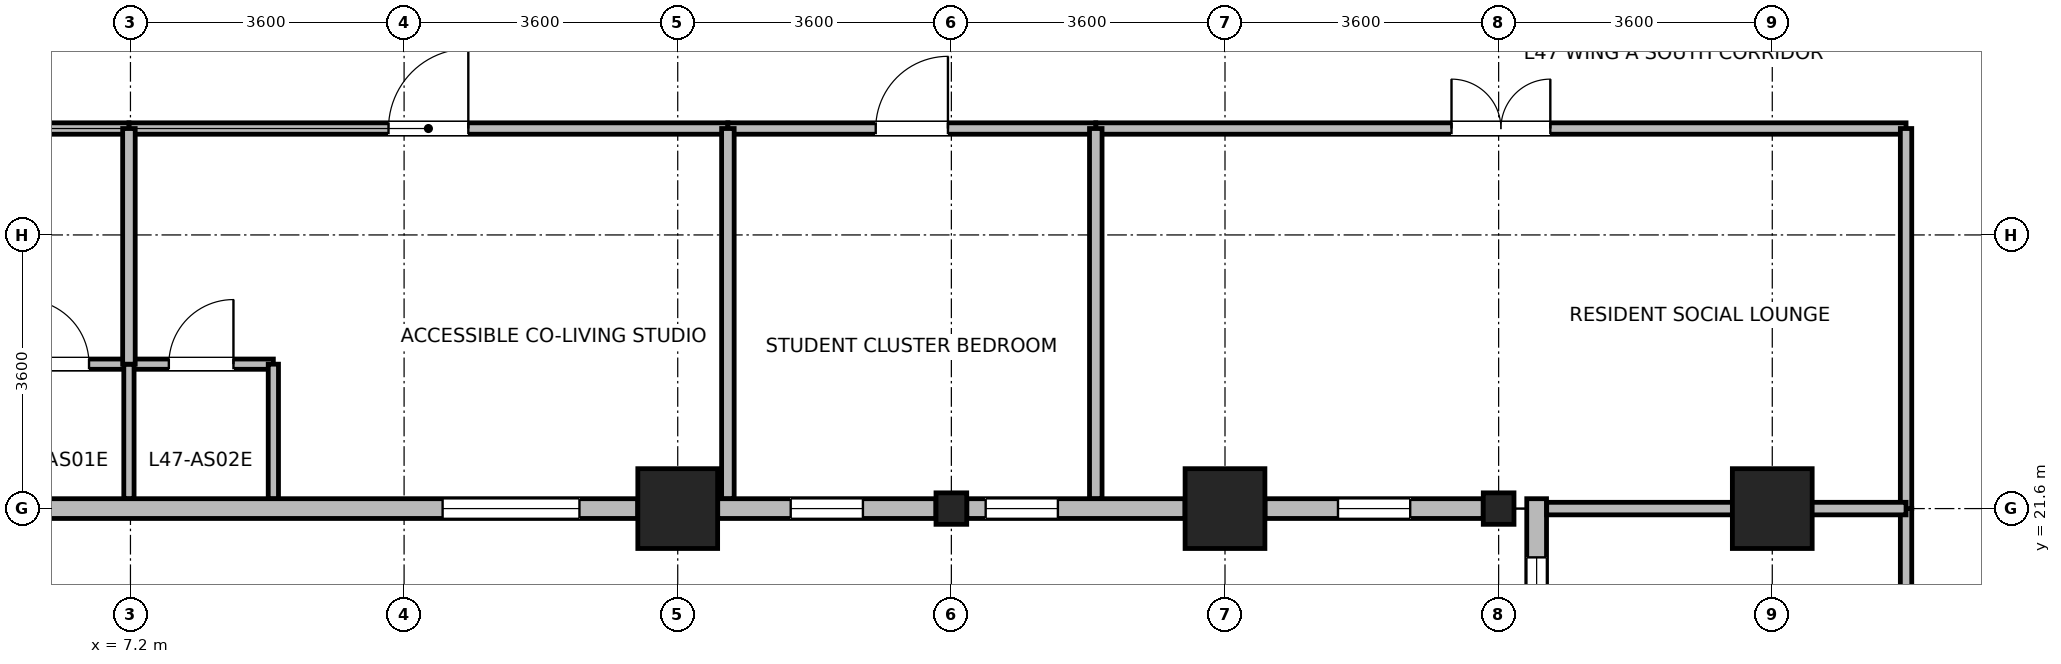
"""IFC4 building model, lengths in metres.
Left out: names, types, materials, properties, quantities, classifications, styles, units other than length and angle.
Written with IfcOpenShell. Run it as: python <this file> out.ifc"""

import sys

from ifc_helpers import new_model, si_unit, direction, frame, frame_2d, origin, origin_2d, place, context, subcontext, project, spatial, rectangle, i_section, extrude, source, transform, mapped, element, fill, save


model = new_model("IFC4")
c1 = context("Model", 3, precision=1e-05, world=origin(), true_north=direction((0.0, 1.0)))
c2 = subcontext(c1, "Body", "Model", "MODEL_VIEW")
j1 = project(units=[si_unit("LENGTHUNIT", "METRE"), si_unit("PLANEANGLEUNIT", "RADIAN")], contexts=[c1])
p1 = place(None, origin())
s1 = spatial("IfcSite", under=j1, at=p1, CompositionType="ELEMENT")
p2 = place(p1, origin())
s2 = spatial("IfcBuilding", under=s1, at=p2, CompositionType="ELEMENT")
p3 = place(p2, frame((0.0, 0.0, 184.6)))
s3 = spatial("IfcBuildingStorey", under=s2, at=p3, CompositionType="ELEMENT", Elevation=184.6)
m1 = source(origin(), c2, "Body", "SweptSolid", [
    extrude(rectangle(XDim=1.05, YDim=1.05, at=origin_2d()), origin(), (0.0, 0.0, 1.0), 3.7),
])
for number, where, z_axis, x_axis in (
    (1, (14.4, 21.6, 0.0), (0.0, 0.0, 1.0), (1.0, 0.0, 0.0)),
    (2, (21.6, 21.6, 0.0), (0.0, 0.0, 1.0), (1.0, 0.0, 0.0)),
    (3, (28.8, 21.6, 0.0), (0.0, 0.0, 1.0), (1.0, 0.0, 0.0)),
):
    element("IfcColumn", number, at=place(p3, frame(where, z_axis=z_axis, x_axis=x_axis)), inside=s3, PredefinedType="COLUMN", context=c2, shape_type="MappedRepresentation", body=[
        mapped(m1, transform((0.0, 0.0, 0.0), x_axis=(1.0, 0.0, 0.0), y_axis=(0.0, 1.0, 0.0), z_axis=(0.0, 0.0, 1.0), scale=1.0)),
    ])
m2 = source(origin(), c2, "Body", "SweptSolid", [
    extrude(i_section(OverallWidth=0.404, OverallDepth=0.414, WebThickness=0.021, FlangeThickness=0.028, FilletRadius=0.015, at=origin_2d()), origin(), (0.0, 0.0, 1.0), 3.7),
])
for number, where, z_axis, x_axis in (
    (4, (18.0, 21.6, 0.0), (0.0, 0.0, 1.0), (1.0, 0.0, 0.0)),
    (5, (25.2, 21.6, 0.0), (0.0, 0.0, 1.0), (1.0, 0.0, 0.0)),
):
    element("IfcColumn", number, at=place(p3, frame(where, z_axis=z_axis, x_axis=x_axis)), inside=s3, PredefinedType="COLUMN", context=c2, shape_type="MappedRepresentation", body=[
        mapped(m2, transform((0.0, 0.0, 0.0), x_axis=(1.0, 0.0, 0.0), y_axis=(0.0, 1.0, 0.0), z_axis=(0.0, 0.0, 1.0), scale=1.0)),
    ])
p4 = place(p3, frame((13.874, 21.6, 0.0), z_axis=(0.0, 0.0, 1.0), x_axis=(-1.0, 0.0, 0.0)))
e6 = element("IfcWall", 6, at=p4, inside=s3, PredefinedType="STANDARD", context=c2, shape_type="SweptSolid", body=[
    extrude(rectangle(XDim=13.337, YDim=0.26, at=frame_2d((6.668, 0.0))), origin(), (0.0, 0.0, 1.0), 3.44),
])
p5 = place(p4, frame((0.767, 0.0, 0.85)))
e7 = element("IfcOpeningElement", 7, at=p5, cuts=e6, PredefinedType="OPENING", context=c2, shape_type="SweptSolid", body=[
    extrude(rectangle(XDim=1.8, YDim=1.85, at=frame_2d((0.9, 0.925))), frame((0.0, 0.14, 0.0), z_axis=(0.0, -1.0, 0.0), x_axis=(1.0, 0.0, 0.0)), (0.0, 0.0, 1.0), 0.28),
])
p6 = place(p4, frame((10.77, 0.0, 0.85)))
e8 = element("IfcOpeningElement", 8, at=p6, cuts=e6, PredefinedType="OPENING", context=c2, shape_type="SweptSolid", body=[
    extrude(rectangle(XDim=1.8, YDim=1.85, at=frame_2d((0.9, 0.925))), frame((0.0, 0.14, 0.0), z_axis=(0.0, -1.0, 0.0), x_axis=(1.0, 0.0, 0.0)), (0.0, 0.0, 1.0), 0.28),
])
p7 = place(p3, frame((17.797, 21.6, 0.0), z_axis=(0.0, 0.0, 1.0), x_axis=(-1.0, 0.0, 0.0)))
e9 = element("IfcWall", 9, at=p7, inside=s3, PredefinedType="STANDARD", context=c2, shape_type="SweptSolid", body=[
    extrude(rectangle(XDim=2.871, YDim=0.26, at=frame_2d((1.436, 0.0))), origin(), (0.0, 0.0, 1.0), 2.99),
])
p8 = place(p7, frame((0.96, 0.0, 0.85)))
e10 = element("IfcOpeningElement", 10, at=p8, cuts=e9, PredefinedType="OPENING", context=c2, shape_type="SweptSolid", body=[
    extrude(rectangle(XDim=0.95, YDim=1.75, at=frame_2d((0.475, 0.875))), frame((0.0, 0.14, 0.0), z_axis=(0.0, -1.0, 0.0), x_axis=(1.0, 0.0, 0.0)), (0.0, 0.0, 1.0), 0.28),
])
p9 = place(p3, frame((21.074, 21.6, 0.0), z_axis=(0.0, 0.0, 1.0), x_axis=(-1.0, 0.0, 0.0)))
e11 = element("IfcWall", 11, at=p9, inside=s3, PredefinedType="STANDARD", context=c2, shape_type="SweptSolid", body=[
    extrude(rectangle(XDim=2.871, YDim=0.26, at=frame_2d((1.436, 0.0))), origin(), (0.0, 0.0, 1.0), 2.99),
])
p10 = place(p9, frame((1.673, 0.0, 0.85)))
e12 = element("IfcOpeningElement", 12, at=p10, cuts=e11, PredefinedType="OPENING", context=c2, shape_type="SweptSolid", body=[
    extrude(rectangle(XDim=0.95, YDim=1.75, at=frame_2d((0.475, 0.875))), frame((0.0, 0.14, 0.0), z_axis=(0.0, -1.0, 0.0), x_axis=(1.0, 0.0, 0.0)), (0.0, 0.0, 1.0), 0.28),
])
p11 = place(p3, frame((24.997, 21.6, 0.0), z_axis=(0.0, 0.0, 1.0), x_axis=(-1.0, 0.0, 0.0)))
e13 = element("IfcWall", 13, at=p11, inside=s3, PredefinedType="STANDARD", context=c2, shape_type="SweptSolid", body=[
    extrude(rectangle(XDim=2.871, YDim=0.26, at=frame_2d((1.436, 0.0))), origin(), (0.0, 0.0, 1.0), 2.99),
])
p12 = place(p11, frame((0.96, 0.0, 0.85)))
e14 = element("IfcOpeningElement", 14, at=p12, cuts=e13, PredefinedType="OPENING", context=c2, shape_type="SweptSolid", body=[
    extrude(rectangle(XDim=0.95, YDim=1.75, at=frame_2d((0.475, 0.875))), frame((0.0, 0.14, 0.0), z_axis=(0.0, -1.0, 0.0), x_axis=(1.0, 0.0, 0.0)), (0.0, 0.0, 1.0), 0.28),
])
p13 = place(p3, frame((25.7, 1.67, 0.0), z_axis=(0.0, 0.0, 1.0), x_axis=(0.0, 1.0, 0.0)))
e15 = element("IfcWall", 15, at=p13, inside=s3, PredefinedType="STANDARD", context=c2, shape_type="SweptSolid", body=[
    extrude(rectangle(XDim=20.06, YDim=0.26, at=frame_2d((10.03, 0.0))), origin(), (0.0, 0.0, 1.0), 3.44),
])
p14 = place(p13, frame((0.772, 0.0, 0.85)))
e16 = element("IfcOpeningElement", 16, at=p14, cuts=e15, PredefinedType="OPENING", context=c2, shape_type="SweptSolid", body=[
    extrude(rectangle(XDim=1.8, YDim=1.85, at=frame_2d((0.9, 0.925))), frame((0.0, 0.14, 0.0), z_axis=(0.0, -1.0, 0.0), x_axis=(1.0, 0.0, 0.0)), (0.0, 0.0, 1.0), 0.28),
])
p15 = place(p13, frame((7.458, 0.0, 0.85)))
e17 = element("IfcOpeningElement", 17, at=p15, cuts=e15, PredefinedType="OPENING", context=c2, shape_type="SweptSolid", body=[
    extrude(rectangle(XDim=1.8, YDim=1.85, at=frame_2d((0.9, 0.925))), frame((0.0, 0.14, 0.0), z_axis=(0.0, -1.0, 0.0), x_axis=(1.0, 0.0, 0.0)), (0.0, 0.0, 1.0), 0.28),
])
p16 = place(p13, frame((14.145, 0.0, 0.85)))
e18 = element("IfcOpeningElement", 18, at=p16, cuts=e15, PredefinedType="OPENING", context=c2, shape_type="SweptSolid", body=[
    extrude(rectangle(XDim=1.8, YDim=1.85, at=frame_2d((0.9, 0.925))), frame((0.0, 0.14, 0.0), z_axis=(0.0, -1.0, 0.0), x_axis=(1.0, 0.0, 0.0)), (0.0, 0.0, 1.0), 0.28),
])
p17 = place(p13, frame((17.488, 0.0, 0.85)))
e19 = element("IfcOpeningElement", 19, at=p17, cuts=e15, PredefinedType="OPENING", context=c2, shape_type="SweptSolid", body=[
    extrude(rectangle(XDim=1.8, YDim=1.85, at=frame_2d((0.9, 0.925))), frame((0.0, 0.14, 0.0), z_axis=(0.0, -1.0, 0.0), x_axis=(1.0, 0.0, 0.0)), (0.0, 0.0, 1.0), 0.28),
])
p18 = place(p3, frame((7.18, 23.5, 0.0), z_axis=(0.0, 0.0, 1.0), x_axis=(1.0, 0.0, 0.0)))
e20 = element("IfcWall", 20, at=p18, inside=s3, PredefinedType="PARTITIONING", context=c2, shape_type="SweptSolid", body=[
    extrude(rectangle(XDim=1.9, YDim=0.135, at=frame_2d((0.95, 0.0))), origin(), (0.0, 0.0, 1.0), 3.44),
])
p19 = place(p18, frame((0.525, 0.0, 0.0)))
e21 = element("IfcOpeningElement", 21, at=p19, cuts=e20, PredefinedType="OPENING", context=c2, shape_type="SweptSolid", body=[
    extrude(rectangle(XDim=0.85, YDim=2.04, at=frame_2d((0.425, 1.02))), frame((0.0, 0.078, 0.0), z_axis=(0.0, -1.0, 0.0), x_axis=(1.0, 0.0, 0.0)), (0.0, 0.0, 1.0), 0.155),
])
p20 = place(p3, frame((5.28, 23.5, 0.0), z_axis=(0.0, 0.0, 1.0), x_axis=(1.0, 0.0, 0.0)))
e22 = element("IfcWall", 22, at=p20, inside=s3, PredefinedType="PARTITIONING", context=c2, shape_type="SweptSolid", body=[
    extrude(rectangle(XDim=1.9, YDim=0.135, at=frame_2d((0.95, 0.0))), origin(), (0.0, 0.0, 1.0), 3.44),
])
p21 = place(p20, frame((0.525, 0.0, 0.0)))
e23 = element("IfcOpeningElement", 23, at=p21, cuts=e22, PredefinedType="OPENING", context=c2, shape_type="SweptSolid", body=[
    extrude(rectangle(XDim=0.85, YDim=2.04, at=frame_2d((0.425, 1.02))), frame((0.0, 0.078, 0.0), z_axis=(0.0, -1.0, 0.0), x_axis=(1.0, 0.0, 0.0)), (0.0, 0.0, 1.0), 0.155),
])
for number, where, z_axis, x_axis in (
    (24, (7.18, 21.732, 0.0), (0.0, 0.0, 1.0), (0.0, 1.0, 0.0)),
    (25, (9.08, 21.732, 0.0), (0.0, 0.0, 1.0), (0.0, 1.0, 0.0)),
):
    element("IfcWall", number, at=place(p3, frame(where, z_axis=z_axis, x_axis=x_axis)), inside=s3, PredefinedType="PARTITIONING", context=c2, shape_type="SweptSolid", body=[
        extrude(rectangle(XDim=1.768, YDim=0.135, at=frame_2d((0.884, 0.0))), origin(), (0.0, 0.0, 1.0), 3.44),
    ])
p22 = place(p3, frame((19.9, 26.6, 0.0), z_axis=(0.0, 0.0, 1.0), x_axis=(1.0, 0.0, 0.0)))
e26 = element("IfcWall", 26, at=p22, inside=s3, PredefinedType="PARTITIONING", context=c2, shape_type="SweptSolid", body=[
    extrude(rectangle(XDim=10.66, YDim=0.15, at=frame_2d((5.33, 0.0))), origin(), (0.0, 0.0, 1.0), 3.44),
])
p23 = place(p22, frame((4.68, 0.0, 0.0)))
e27 = element("IfcOpeningElement", 27, at=p23, cuts=e26, PredefinedType="OPENING", context=c2, shape_type="SweptSolid", body=[
    extrude(rectangle(XDim=1.3, YDim=2.12, at=frame_2d((0.65, 1.06))), frame((0.0, 0.085, 0.0), z_axis=(0.0, -1.0, 0.0), x_axis=(1.0, 0.0, 0.0)), (0.0, 0.0, 1.0), 0.17),
])
p24 = place(p3, frame((7.18, 26.6, 0.0), z_axis=(0.0, 0.0, 1.0), x_axis=(1.0, 0.0, 0.0)))
e28 = element("IfcWall", 28, at=p24, inside=s3, PredefinedType="PARTITIONING", context=c2, shape_type="SweptSolid", body=[
    extrude(rectangle(XDim=7.88, YDim=0.15, at=frame_2d((3.94, 0.0))), origin(), (0.0, 0.0, 1.0), 3.44),
])
p25 = place(p24, frame((3.415, 0.0, 0.0)))
e29 = element("IfcOpeningElement", 29, at=p25, cuts=e28, PredefinedType="OPENING", context=c2, shape_type="SweptSolid", body=[
    extrude(rectangle(XDim=1.05, YDim=2.12, at=frame_2d((0.525, 1.06))), frame((0.0, 0.085, 0.0), z_axis=(0.0, -1.0, 0.0), x_axis=(1.0, 0.0, 0.0)), (0.0, 0.0, 1.0), 0.17),
])
p26 = place(p3, frame((30.56, 14.5, 0.0), z_axis=(0.0, 0.0, 1.0), x_axis=(0.0, 1.0, 0.0)))
e30 = element("IfcWall", 30, at=p26, inside=s3, PredefinedType="PARTITIONING", context=c2, shape_type="SweptSolid", body=[
    extrude(rectangle(XDim=7.1, YDim=0.15, at=frame_2d((3.55, 0.0))), origin(), (0.0, 0.0, 1.0), 3.44),
])
p27 = place(p26, frame((2.9, 0.0, 0.0)))
e31 = element("IfcOpeningElement", 31, at=p27, cuts=e30, PredefinedType="OPENING", context=c2, shape_type="SweptSolid", body=[
    extrude(rectangle(XDim=1.3, YDim=2.12, at=frame_2d((0.65, 1.06))), frame((0.0, 0.085, 0.0), z_axis=(0.0, -1.0, 0.0), x_axis=(1.0, 0.0, 0.0)), (0.0, 0.0, 1.0), 0.17),
])
p28 = place(p3, frame((0.52, 26.6, 0.0), z_axis=(0.0, 0.0, 1.0), x_axis=(1.0, 0.0, 0.0)))
e32 = element("IfcWall", 32, at=p28, inside=s3, PredefinedType="PARTITIONING", context=c2, shape_type="SweptSolid", body=[
    extrude(rectangle(XDim=6.66, YDim=0.15, at=frame_2d((3.33, 0.0))), origin(), (0.0, 0.0, 1.0), 3.44),
])
p29 = place(p28, frame((2.855, 0.0, 0.0)))
e33 = element("IfcOpeningElement", 33, at=p29, cuts=e32, PredefinedType="OPENING", context=c2, shape_type="SweptSolid", body=[
    extrude(rectangle(XDim=0.95, YDim=2.1, at=frame_2d((0.475, 1.05))), frame((0.0, 0.085, 0.0), z_axis=(0.0, -1.0, 0.0), x_axis=(1.0, 0.0, 0.0)), (0.0, 0.0, 1.0), 0.17),
])
p30 = place(p3, frame((30.56, 21.6, 0.0), z_axis=(0.0, 0.0, 1.0), x_axis=(0.0, 1.0, 0.0)))
e34 = element("IfcWall", 34, at=p30, inside=s3, PredefinedType="PARTITIONING", context=c2, shape_type="SweptSolid", body=[
    extrude(rectangle(XDim=5.0, YDim=0.15, at=frame_2d((2.5, 0.0))), origin(), (0.0, 0.0, 1.0), 3.44),
])
p31 = place(p3, frame((15.06, 26.6, 0.0), z_axis=(0.0, 0.0, 1.0), x_axis=(1.0, 0.0, 0.0)))
e35 = element("IfcWall", 35, at=p31, inside=s3, PredefinedType="PARTITIONING", context=c2, shape_type="SweptSolid", body=[
    extrude(rectangle(XDim=4.84, YDim=0.15, at=frame_2d((2.42, 0.0))), origin(), (0.0, 0.0, 1.0), 3.44),
])
p32 = place(p31, frame((1.945, 0.0, 0.0)))
e36 = element("IfcOpeningElement", 36, at=p32, cuts=e35, PredefinedType="OPENING", context=c2, shape_type="SweptSolid", body=[
    extrude(rectangle(XDim=0.95, YDim=2.1, at=frame_2d((0.475, 1.05))), frame((0.0, 0.085, 0.0), z_axis=(0.0, -1.0, 0.0), x_axis=(1.0, 0.0, 0.0)), (0.0, 0.0, 1.0), 0.17),
])
for number, where, z_axis, x_axis in (
    (37, (15.06, 21.732, 0.0), (0.0, 0.0, 1.0), (0.0, 1.0, 0.0)),
    (38, (19.9, 21.732, 0.0), (0.0, 0.0, 1.0), (0.0, 1.0, 0.0)),
):
    element("IfcWall", number, at=place(p3, frame(where, z_axis=z_axis, x_axis=x_axis)), inside=s3, PredefinedType="PARTITIONING", context=c2, shape_type="SweptSolid", body=[
        extrude(rectangle(XDim=4.868, YDim=0.165, at=frame_2d((2.434, 0.0))), origin(), (0.0, 0.0, 1.0), 3.44),
    ])
p33 = place(p3, frame((25.832, 21.6, 0.0), z_axis=(0.0, 0.0, 1.0), x_axis=(1.0, 0.0, 0.0)))
e39 = element("IfcWall", 39, at=p33, inside=s3, PredefinedType="PARTITIONING", context=c2, shape_type="SweptSolid", body=[
    extrude(rectangle(XDim=4.728, YDim=0.165, at=frame_2d((2.364, 0.0))), origin(), (0.0, 0.0, 1.0), 2.99),
])
p34 = place(p3, frame((7.18, 23.5, 0.0), z_axis=(0.0, 0.0, 1.0), x_axis=(0.0, 1.0, 0.0)))
e40 = element("IfcWall", 40, at=p34, inside=s3, PredefinedType="PARTITIONING", context=c2, shape_type="SweptSolid", body=[
    extrude(rectangle(XDim=3.1, YDim=0.165, at=frame_2d((1.55, 0.0))), origin(), (0.0, 0.0, 1.0), 3.44),
])
p35 = place(p5, origin())
e41 = element("IfcWindow", 41, at=p35, inside=s3, PartitioningType="SINGLE_PANEL", PredefinedType="WINDOW", context=c2, shape_type="SweptSolid", body=[
    extrude(rectangle(XDim=1.8, YDim=1.85, at=frame_2d((0.9, 0.925))), frame((0.0, 0.03, 0.0), z_axis=(0.0, -1.0, 0.0), x_axis=(1.0, 0.0, 0.0)), (0.0, 0.0, 1.0), 0.06),
])
fill(e7, e41)
p36 = place(p8, origin())
e42 = element("IfcWindow", 42, at=p36, inside=s3, PartitioningType="SINGLE_PANEL", PredefinedType="WINDOW", context=c2, shape_type="SweptSolid", body=[
    extrude(rectangle(XDim=0.95, YDim=1.75, at=frame_2d((0.475, 0.875))), frame((0.0, 0.03, 0.0), z_axis=(0.0, -1.0, 0.0), x_axis=(1.0, 0.0, 0.0)), (0.0, 0.0, 1.0), 0.06),
])
fill(e10, e42)
p37 = place(p10, origin())
e43 = element("IfcWindow", 43, at=p37, inside=s3, PartitioningType="SINGLE_PANEL", PredefinedType="WINDOW", context=c2, shape_type="SweptSolid", body=[
    extrude(rectangle(XDim=0.95, YDim=1.75, at=frame_2d((0.475, 0.875))), frame((0.0, 0.03, 0.0), z_axis=(0.0, -1.0, 0.0), x_axis=(1.0, 0.0, 0.0)), (0.0, 0.0, 1.0), 0.06),
])
fill(e12, e43)
p38 = place(p12, origin())
e44 = element("IfcWindow", 44, at=p38, inside=s3, PartitioningType="SINGLE_PANEL", PredefinedType="WINDOW", context=c2, shape_type="SweptSolid", body=[
    extrude(rectangle(XDim=0.95, YDim=1.75, at=frame_2d((0.475, 0.875))), frame((0.0, 0.03, 0.0), z_axis=(0.0, -1.0, 0.0), x_axis=(1.0, 0.0, 0.0)), (0.0, 0.0, 1.0), 0.06),
])
fill(e14, e44)
p39 = place(p17, origin())
e45 = element("IfcWindow", 45, at=p39, inside=s3, PartitioningType="SINGLE_PANEL", PredefinedType="WINDOW", context=c2, shape_type="SweptSolid", body=[
    extrude(rectangle(XDim=1.8, YDim=1.85, at=frame_2d((0.9, 0.925))), frame((0.0, 0.03, 0.0), z_axis=(0.0, -1.0, 0.0), x_axis=(1.0, 0.0, 0.0)), (0.0, 0.0, 1.0), 0.06),
])
fill(e19, e45)
p40 = place(p19, origin())
e46 = element("IfcDoor", 46, at=p40, inside=s3, OperationType="SINGLE_SWING_RIGHT", PredefinedType="DOOR", context=c2, shape_type="SweptSolid", body=[
    extrude(rectangle(XDim=0.85, YDim=2.04, at=frame_2d((0.425, 1.02))), frame((0.0, 0.025, 0.0), z_axis=(0.0, -1.0, 0.0), x_axis=(1.0, 0.0, 0.0)), (0.0, 0.0, 1.0), 0.05),
])
fill(e21, e46)
p41 = place(p21, origin())
e47 = element("IfcDoor", 47, at=p41, inside=s3, OperationType="SINGLE_SWING_LEFT", PredefinedType="DOOR", context=c2, shape_type="SweptSolid", body=[
    extrude(rectangle(XDim=0.85, YDim=2.04, at=frame_2d((0.425, 1.02))), frame((0.0, 0.025, 0.0), z_axis=(0.0, -1.0, 0.0), x_axis=(1.0, 0.0, 0.0)), (0.0, 0.0, 1.0), 0.05),
])
fill(e23, e47)
p42 = place(p23, origin())
e48 = element("IfcDoor", 48, at=p42, inside=s3, OperationType="DOUBLE_DOOR_SINGLE_SWING", PredefinedType="DOOR", context=c2, shape_type="SweptSolid", body=[
    extrude(rectangle(XDim=1.3, YDim=2.12, at=frame_2d((0.65, 1.06))), frame((0.0, 0.025, 0.0), z_axis=(0.0, -1.0, 0.0), x_axis=(1.0, 0.0, 0.0)), (0.0, 0.0, 1.0), 0.05),
])
fill(e27, e48)
p43 = place(p25, origin())
e49 = element("IfcDoor", 49, at=p43, inside=s3, OperationType="SINGLE_SWING_RIGHT", PredefinedType="DOOR", context=c2, shape_type="SweptSolid", body=[
    extrude(rectangle(XDim=1.05, YDim=2.12, at=frame_2d((0.525, 1.06))), frame((0.0, 0.025, 0.0), z_axis=(0.0, -1.0, 0.0), x_axis=(1.0, 0.0, 0.0)), (0.0, 0.0, 1.0), 0.05),
])
fill(e29, e49)
p44 = place(p32, origin())
e50 = element("IfcDoor", 50, at=p44, inside=s3, OperationType="SINGLE_SWING_RIGHT", PredefinedType="DOOR", context=c2, shape_type="SweptSolid", body=[
    extrude(rectangle(XDim=0.95, YDim=2.1, at=frame_2d((0.475, 1.05))), frame((0.0, 0.025, 0.0), z_axis=(0.0, -1.0, 0.0), x_axis=(1.0, 0.0, 0.0)), (0.0, 0.0, 1.0), 0.05),
])
fill(e36, e50)
save(model, sys.argv[1])
